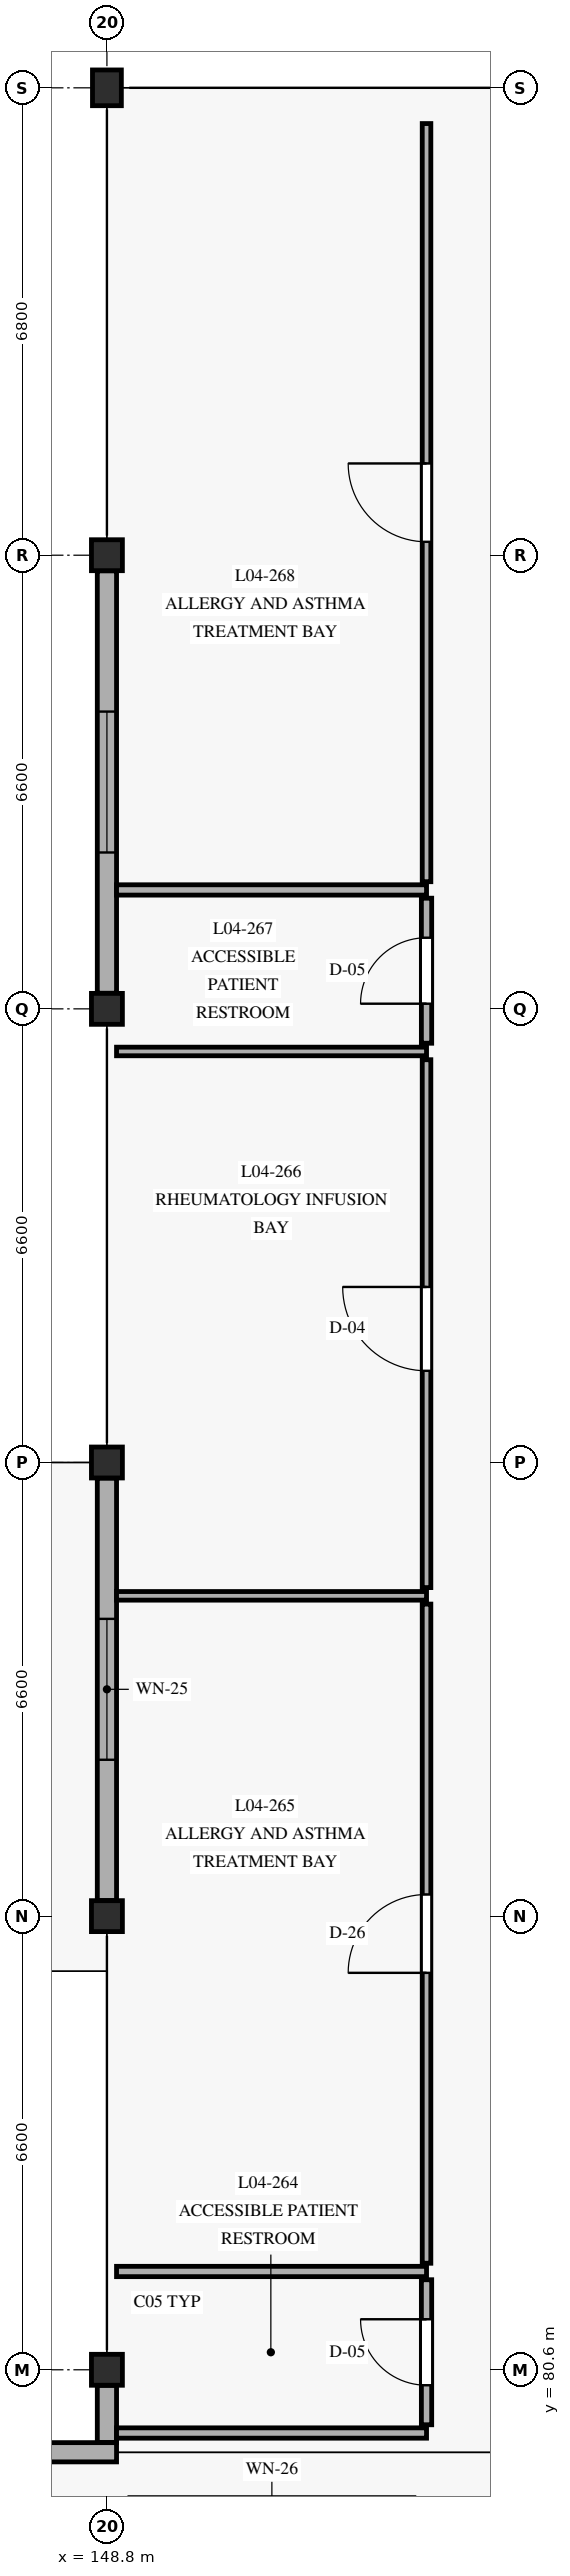
"""IFC4 building model, lengths in metres.
Left out: names, types, materials, properties, quantities, classifications, styles, units other than length and angle.
Written with IfcOpenShell. Run it as: python <this file> out.ifc"""

import sys

from ifc_helpers import new_model, si_unit, direction, frame, frame_2d, origin, origin_with_axes, origin_2d, place, context, subcontext, project, spatial, rectangle, extrude, element, fill, save


model = new_model("IFC4")
c1 = context("Model", 3, precision=1e-05, world=origin(), true_north=direction((0.0, 1.0)))
c2 = subcontext(c1, "Body", "Model", "MODEL_VIEW")
j1 = project(units=[si_unit("LENGTHUNIT", "METRE"), si_unit("PLANEANGLEUNIT", "RADIAN")], contexts=[c1])
p1 = place(None, origin())
s1 = spatial("IfcSite", under=j1, at=p1, CompositionType="ELEMENT")
p2 = place(p1, origin())
s2 = spatial("IfcBuilding", under=s1, at=p2, CompositionType="ELEMENT")
p3 = place(p2, frame((0.0, 0.0, 13.5)))
s3 = spatial("IfcBuildingStorey", under=s2, at=p3, CompositionType="ELEMENT", Elevation=13.5)
for number, where, z_axis, x_axis in (
    (1, (148.8, 80.6, 0.0), (0.0, 0.0, 1.0), (1.0, 0.0, 0.0)),
    (2, (148.8, 87.2, 0.0), (0.0, 0.0, 1.0), (1.0, 0.0, 0.0)),
    (3, (148.8, 93.8, 0.0), (0.0, 0.0, 1.0), (1.0, 0.0, 0.0)),
    (4, (148.8, 100.4, 0.0), (0.0, 0.0, 1.0), (1.0, 0.0, 0.0)),
    (5, (148.8, 107.0, 0.0), (0.0, 0.0, 1.0), (1.0, 0.0, 0.0)),
):
    element("IfcColumn", number, at=place(p3, frame(where, z_axis=z_axis, x_axis=x_axis)), inside=s3, PredefinedType="COLUMN", context=c2, shape_type="SweptSolid", body=[
        extrude(rectangle(XDim=0.45, YDim=0.45, at=origin_2d()), origin(), (0.0, 0.0, 1.0), 4.05),
    ])
p4 = place(p3, frame((148.8, 113.8, 0.0), z_axis=(0.0, 0.0, 1.0), x_axis=(1.0, 0.0, 0.0)))
e6 = element("IfcColumn", 6, at=p4, inside=s3, PredefinedType="COLUMN", context=c2, shape_type="SweptSolid", body=[
    extrude(rectangle(XDim=0.42, YDim=0.52, at=origin_2d()), origin(), (0.0, 0.0, 1.0), 4.05),
])
p5 = place(p3, frame((148.8, 80.373, 0.0), z_axis=(0.0, 0.0, 1.0), x_axis=(0.0, -1.0, 0.0)))
e7 = element("IfcWall", 7, at=p5, inside=s3, PredefinedType="SOLIDWALL", context=c2, shape_type="SweptSolid", body=[
    extrude(rectangle(XDim=0.831, YDim=0.28, at=frame_2d((0.416, 0.0))), origin(), (0.0, 0.0, 1.0), 3.39),
])
p6 = place(p3, frame((148.8, 93.573, 0.0), z_axis=(0.0, 0.0, 1.0), x_axis=(0.0, -1.0, 0.0)))
e8 = element("IfcWall", 8, at=p6, inside=s3, PredefinedType="SOLIDWALL", context=c2, shape_type="SweptSolid", body=[
    extrude(rectangle(XDim=6.146, YDim=0.28, at=frame_2d((3.073, 0.0))), origin(), (0.0, 0.0, 1.0), 3.39),
])
p7 = place(p6, frame((2.048, 0.0, 0.8)))
e9 = element("IfcOpeningElement", 9, at=p7, cuts=e8, PredefinedType="OPENING", context=c2, shape_type="SweptSolid", body=[
    extrude(rectangle(XDim=2.05, YDim=1.95, at=frame_2d((1.025, 0.975))), frame((0.0, 0.15, 0.0), z_axis=(0.0, -1.0, 0.0), x_axis=(1.0, 0.0, 0.0)), (0.0, 0.0, 1.0), 0.3),
])
p8 = place(p3, frame((148.8, 106.773, 0.0), z_axis=(0.0, 0.0, 1.0), x_axis=(0.0, -1.0, 0.0)))
e10 = element("IfcWall", 10, at=p8, inside=s3, PredefinedType="SOLIDWALL", context=c2, shape_type="SweptSolid", body=[
    extrude(rectangle(XDim=6.146, YDim=0.28, at=frame_2d((3.073, 0.0))), origin(), (0.0, 0.0, 1.0), 3.39),
])
p9 = place(p8, frame((2.048, 0.0, 0.8)))
e11 = element("IfcOpeningElement", 11, at=p9, cuts=e10, PredefinedType="OPENING", context=c2, shape_type="SweptSolid", body=[
    extrude(rectangle(XDim=2.05, YDim=1.95, at=frame_2d((1.025, 0.975))), frame((0.0, 0.15, 0.0), z_axis=(0.0, -1.0, 0.0), x_axis=(1.0, 0.0, 0.0)), (0.0, 0.0, 1.0), 0.3),
])
p10 = place(p3, frame((148.94, 79.4, 0.0), z_axis=(0.0, 0.0, 1.0), x_axis=(-1.0, 0.0, 0.0)))
e12 = element("IfcWall", 12, at=p10, inside=s3, PredefinedType="SOLIDWALL", context=c2, shape_type="SweptSolid", body=[
    extrude(rectangle(XDim=3.28, YDim=0.28, at=frame_2d((1.64, 0.0))), origin(), (0.0, 0.0, 1.0), 3.77),
])
p11 = place(p10, frame((1.115, 0.0, 0.88)))
e13 = element("IfcOpeningElement", 13, at=p11, cuts=e12, PredefinedType="OPENING", context=c2, shape_type="SweptSolid", body=[
    extrude(rectangle(XDim=1.05, YDim=2.2, at=frame_2d((0.525, 1.1))), frame((0.0, 0.15, 0.0), z_axis=(0.0, -1.0, 0.0), x_axis=(1.0, 0.0, 0.0)), (0.0, 0.0, 1.0), 0.3),
])
p12 = place(p3, frame((153.45, 79.8, 0.0), z_axis=(0.0, 0.0, 1.0), x_axis=(0.0, 1.0, 0.0)))
e14 = element("IfcWall", 14, at=p12, inside=s3, PredefinedType="PARTITIONING", context=c2, shape_type="SweptSolid", body=[
    extrude(rectangle(XDim=2.11, YDim=0.15, at=frame_2d((1.055, 0.0))), origin(), (0.0, 0.0, 1.0), 3.365),
])
p13 = place(p12, frame((0.575, 0.0, 0.0)))
e15 = element("IfcOpeningElement", 15, at=p13, cuts=e14, PredefinedType="OPENING", context=c2, shape_type="SweptSolid", body=[
    extrude(rectangle(XDim=0.96, YDim=2.1, at=frame_2d((0.48, 1.05))), frame((0.0, 0.085, 0.0), z_axis=(0.0, -1.0, 0.0), x_axis=(1.0, 0.0, 0.0)), (0.0, 0.0, 1.0), 0.17),
])
for number, where, z_axis, x_axis in (
    (16, (148.94, 79.68, 0.0), (0.0, 0.0, 1.0), (1.0, 0.0, 0.0)),
    (17, (148.94, 82.03, 0.0), (0.0, 0.0, 1.0), (1.0, 0.0, 0.0)),
):
    element("IfcWall", number, at=place(p3, frame(where, z_axis=z_axis, x_axis=x_axis)), inside=s3, PredefinedType="PARTITIONING", context=c2, shape_type="SweptSolid", body=[
        extrude(rectangle(XDim=4.51, YDim=0.15, at=frame_2d((2.255, 0.0))), origin(), (0.0, 0.0, 1.0), 3.385),
    ])
p14 = place(p3, frame((153.45, 82.15, 0.0), z_axis=(0.0, 0.0, 1.0), x_axis=(0.0, 1.0, 0.0)))
e18 = element("IfcWall", 18, at=p14, inside=s3, PredefinedType="PARTITIONING", context=c2, shape_type="SweptSolid", body=[
    extrude(rectangle(XDim=9.59, YDim=0.125, at=frame_2d((4.795, 0.0))), origin(), (0.0, 0.0, 1.0), 3.365),
])
p15 = place(p14, frame((4.225, 0.0, 0.0)))
e19 = element("IfcOpeningElement", 19, at=p15, cuts=e18, PredefinedType="OPENING", context=c2, shape_type="SweptSolid", body=[
    extrude(rectangle(XDim=1.14, YDim=2.22, at=frame_2d((0.57, 1.11))), frame((0.0, 0.073, 0.0), z_axis=(0.0, -1.0, 0.0), x_axis=(1.0, 0.0, 0.0)), (0.0, 0.0, 1.0), 0.145),
])
p16 = place(p3, frame((148.94, 91.86, 0.0), z_axis=(0.0, 0.0, 1.0), x_axis=(1.0, 0.0, 0.0)))
e20 = element("IfcWall", 20, at=p16, inside=s3, PredefinedType="PARTITIONING", context=c2, shape_type="SweptSolid", body=[
    extrude(rectangle(XDim=4.51, YDim=0.125, at=frame_2d((2.255, 0.0))), origin(), (0.0, 0.0, 1.0), 3.385),
])
p17 = place(p3, frame((153.45, 91.98, 0.0), z_axis=(0.0, 0.0, 1.0), x_axis=(0.0, 1.0, 0.0)))
e21 = element("IfcWall", 21, at=p17, inside=s3, PredefinedType="PARTITIONING", context=c2, shape_type="SweptSolid", body=[
    extrude(rectangle(XDim=7.68, YDim=0.125, at=frame_2d((3.84, 0.0))), origin(), (0.0, 0.0, 1.0), 3.365),
])
p18 = place(p17, frame((3.154, 0.0, 0.0)))
e22 = element("IfcOpeningElement", 22, at=p18, cuts=e21, PredefinedType="OPENING", context=c2, shape_type="SweptSolid", body=[
    extrude(rectangle(XDim=1.22, YDim=2.2, at=frame_2d((0.61, 1.1))), frame((0.0, 0.073, 0.0), z_axis=(0.0, -1.0, 0.0), x_axis=(1.0, 0.0, 0.0)), (0.0, 0.0, 1.0), 0.145),
])
p19 = place(p3, frame((148.94, 99.78, 0.0), z_axis=(0.0, 0.0, 1.0), x_axis=(1.0, 0.0, 0.0)))
e23 = element("IfcWall", 23, at=p19, inside=s3, PredefinedType="PARTITIONING", context=c2, shape_type="SweptSolid", body=[
    extrude(rectangle(XDim=4.51, YDim=0.125, at=frame_2d((2.255, 0.0))), origin(), (0.0, 0.0, 1.0), 3.385),
])
p20 = place(p3, frame((153.45, 99.9, 0.0), z_axis=(0.0, 0.0, 1.0), x_axis=(0.0, 1.0, 0.0)))
e24 = element("IfcWall", 24, at=p20, inside=s3, PredefinedType="PARTITIONING", context=c2, shape_type="SweptSolid", body=[
    extrude(rectangle(XDim=2.11, YDim=0.15, at=frame_2d((1.055, 0.0))), origin(), (0.0, 0.0, 1.0), 3.365),
])
p21 = place(p20, frame((0.575, 0.0, 0.0)))
e25 = element("IfcOpeningElement", 25, at=p21, cuts=e24, PredefinedType="OPENING", context=c2, shape_type="SweptSolid", body=[
    extrude(rectangle(XDim=0.96, YDim=2.1, at=frame_2d((0.48, 1.05))), frame((0.0, 0.085, 0.0), z_axis=(0.0, -1.0, 0.0), x_axis=(1.0, 0.0, 0.0)), (0.0, 0.0, 1.0), 0.17),
])
p22 = place(p3, frame((148.94, 102.13, 0.0), z_axis=(0.0, 0.0, 1.0), x_axis=(1.0, 0.0, 0.0)))
e26 = element("IfcWall", 26, at=p22, inside=s3, PredefinedType="PARTITIONING", context=c2, shape_type="SweptSolid", body=[
    extrude(rectangle(XDim=4.51, YDim=0.15, at=frame_2d((2.255, 0.0))), origin(), (0.0, 0.0, 1.0), 3.385),
])
p23 = place(p3, frame((153.45, 102.25, 0.0), z_axis=(0.0, 0.0, 1.0), x_axis=(0.0, 1.0, 0.0)))
e27 = element("IfcWall", 27, at=p23, inside=s3, PredefinedType="PARTITIONING", context=c2, shape_type="SweptSolid", body=[
    extrude(rectangle(XDim=11.03, YDim=0.125, at=frame_2d((5.515, 0.0))), origin(), (0.0, 0.0, 1.0), 3.365),
])
p24 = place(p23, frame((4.945, 0.0, 0.0)))
e28 = element("IfcOpeningElement", 28, at=p24, cuts=e27, PredefinedType="OPENING", context=c2, shape_type="SweptSolid", body=[
    extrude(rectangle(XDim=1.14, YDim=2.22, at=frame_2d((0.57, 1.11))), frame((0.0, 0.073, 0.0), z_axis=(0.0, -1.0, 0.0), x_axis=(1.0, 0.0, 0.0)), (0.0, 0.0, 1.0), 0.145),
])
p25 = place(p7, origin_with_axes())
e29 = element("IfcWindow", 29, at=p25, inside=s3, PartitioningType="SINGLE_PANEL", PredefinedType="WINDOW", context=c2, shape_type="SweptSolid", body=[
    extrude(rectangle(XDim=2.05, YDim=1.95, at=frame_2d((1.025, 0.975))), frame((0.0, 0.03, 0.0), z_axis=(0.0, -1.0, 0.0), x_axis=(1.0, 0.0, 0.0)), (0.0, 0.0, 1.0), 0.06),
])
fill(e9, e29)
p26 = place(p9, origin_with_axes())
e30 = element("IfcWindow", 30, at=p26, inside=s3, PartitioningType="SINGLE_PANEL", PredefinedType="WINDOW", context=c2, shape_type="SweptSolid", body=[
    extrude(rectangle(XDim=2.05, YDim=1.95, at=frame_2d((1.025, 0.975))), frame((0.0, 0.03, 0.0), z_axis=(0.0, -1.0, 0.0), x_axis=(1.0, 0.0, 0.0)), (0.0, 0.0, 1.0), 0.06),
])
fill(e11, e30)
p27 = place(p13, origin_with_axes())
e31 = element("IfcDoor", 31, at=p27, inside=s3, OperationType="SINGLE_SWING_RIGHT", PredefinedType="DOOR", context=c2, shape_type="SweptSolid", body=[
    extrude(rectangle(XDim=0.96, YDim=2.1, at=frame_2d((0.48, 1.05))), frame((0.0, 0.025, 0.0), z_axis=(0.0, -1.0, 0.0), x_axis=(1.0, 0.0, 0.0)), (0.0, 0.0, 1.0), 0.05),
])
fill(e15, e31)
p28 = place(p15, origin_with_axes())
e32 = element("IfcDoor", 32, at=p28, inside=s3, OperationType="SINGLE_SWING_LEFT", PredefinedType="DOOR", context=c2, shape_type="SweptSolid", body=[
    extrude(rectangle(XDim=1.14, YDim=2.22, at=frame_2d((0.57, 1.11))), frame((0.0, 0.025, 0.0), z_axis=(0.0, -1.0, 0.0), x_axis=(1.0, 0.0, 0.0)), (0.0, 0.0, 1.0), 0.05),
])
fill(e19, e32)
p29 = place(p18, origin_with_axes())
e33 = element("IfcDoor", 33, at=p29, inside=s3, OperationType="SINGLE_SWING_RIGHT", PredefinedType="DOOR", context=c2, shape_type="SweptSolid", body=[
    extrude(rectangle(XDim=1.22, YDim=2.2, at=frame_2d((0.61, 1.1))), frame((0.0, 0.025, 0.0), z_axis=(0.0, -1.0, 0.0), x_axis=(1.0, 0.0, 0.0)), (0.0, 0.0, 1.0), 0.05),
])
fill(e22, e33)
p30 = place(p21, origin_with_axes())
e34 = element("IfcDoor", 34, at=p30, inside=s3, OperationType="SINGLE_SWING_LEFT", PredefinedType="DOOR", context=c2, shape_type="SweptSolid", body=[
    extrude(rectangle(XDim=0.96, YDim=2.1, at=frame_2d((0.48, 1.05))), frame((0.0, 0.025, 0.0), z_axis=(0.0, -1.0, 0.0), x_axis=(1.0, 0.0, 0.0)), (0.0, 0.0, 1.0), 0.05),
])
fill(e25, e34)
p31 = place(p24, origin_with_axes())
e35 = element("IfcDoor", 35, at=p31, inside=s3, OperationType="SINGLE_SWING_RIGHT", PredefinedType="DOOR", context=c2, shape_type="SweptSolid", body=[
    extrude(rectangle(XDim=1.14, YDim=2.22, at=frame_2d((0.57, 1.11))), frame((0.0, 0.025, 0.0), z_axis=(0.0, -1.0, 0.0), x_axis=(1.0, 0.0, 0.0)), (0.0, 0.0, 1.0), 0.05),
])
fill(e28, e35)
save(model, sys.argv[1])
